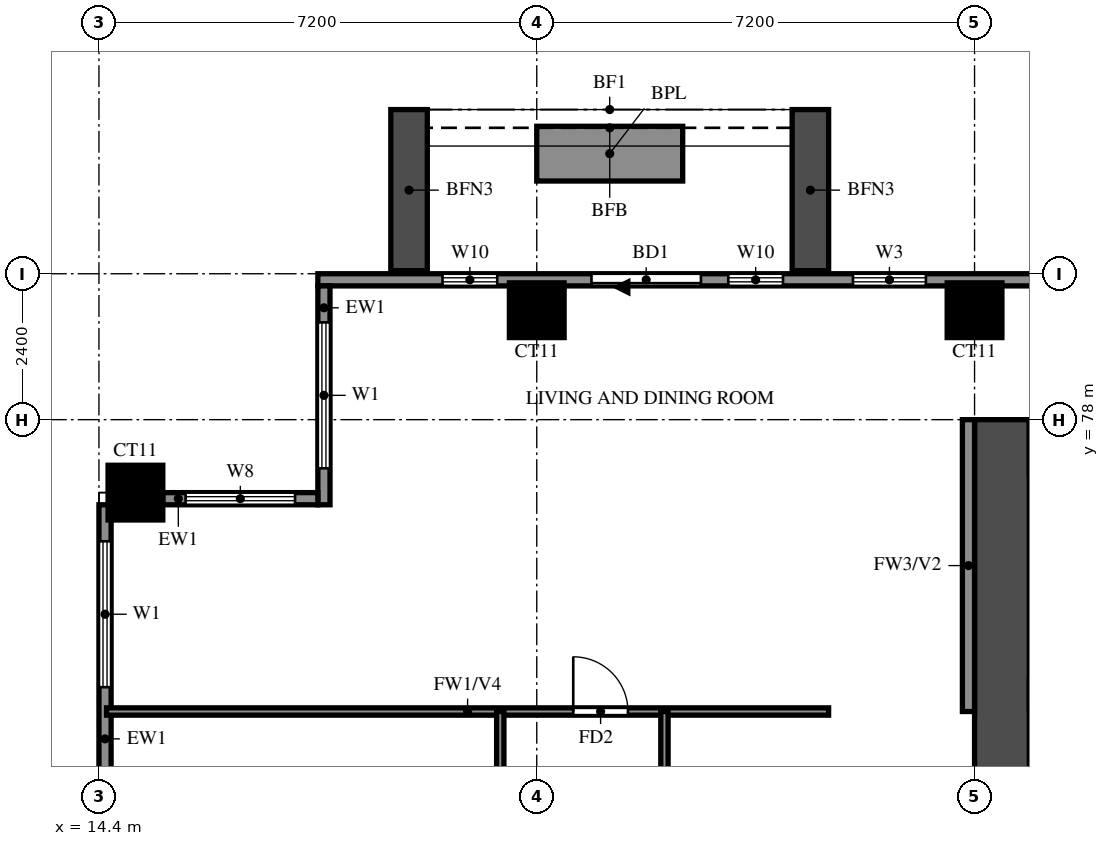
"""IFC4 building model, lengths in metres.
Left out: names, types, materials, properties, quantities, classifications, styles, units other than length and angle.
Written with IfcOpenShell. Run it as: python <this file> out.ifc"""

import sys

from ifc_helpers import new_model, si_unit, direction, frame, frame_2d, origin, origin_2d, place, context, subcontext, project, spatial, rectangle, extrude, source, transform, mapped, element, fill, save


model = new_model("IFC4")
c1 = context("Model", 3, precision=1e-05, world=origin(), true_north=direction((0.0, 1.0)))
c2 = subcontext(c1, "Body", "Model", "MODEL_VIEW")
j1 = project(units=[si_unit("LENGTHUNIT", "METRE"), si_unit("PLANEANGLEUNIT", "RADIAN")], contexts=[c1])
p1 = place(None, origin())
s1 = spatial("IfcSite", under=j1, at=p1, CompositionType="ELEMENT")
p2 = place(p1, origin())
s2 = spatial("IfcBuilding", under=s1, at=p2, CompositionType="ELEMENT")
p3 = place(p2, frame((0.0, 0.0, 100.5)))
s3 = spatial("IfcBuildingStorey", under=s2, at=p3, CompositionType="ELEMENT", Elevation=100.5)
m1 = source(origin(), c2, "Body", "SweptSolid", [
    extrude(rectangle(XDim=0.9, YDim=0.9, at=origin_2d()), origin(), (0.0, 0.0, 1.0), 3.18),
])
for number, where, z_axis, x_axis in (
    (1, (15.0, 76.8, 0.0), (0.0, 0.0, 1.0), (1.0, 0.0, 0.0)),
    (2, (21.6, 79.8, 0.0), (0.0, 0.0, 1.0), (1.0, 0.0, 0.0)),
    (3, (28.8, 79.8, 0.0), (0.0, 0.0, 1.0), (1.0, 0.0, 0.0)),
):
    element("IfcColumn", number, at=place(p3, frame(where, z_axis=z_axis, x_axis=x_axis)), inside=s3, PredefinedType="COLUMN", context=c2, shape_type="MappedRepresentation", body=[
        mapped(m1, transform((0.0, 0.0, 0.0))),
    ])
p4 = place(p3, frame((29.25, 66.0, 0.0), z_axis=(0.0, 0.0, 1.0), x_axis=(0.0, 1.0, 0.0)))
e4 = element("IfcWall", 4, at=p4, inside=s3, PredefinedType="SHEAR", context=c2, shape_type="SweptSolid", body=[
    extrude(rectangle(XDim=12.0, YDim=0.9, at=frame_2d((6.0, 0.0))), origin(), (0.0, 0.0, 1.0), 3.18),
])
p5 = place(p3, frame((29.7, 73.475, 0.0), z_axis=(0.0, 0.0, 1.0), x_axis=(1.0, 0.0, 0.0)))
e5 = element("IfcWall", 5, at=p5, inside=s3, PredefinedType="SHEAR", context=c2, shape_type="SweptSolid", body=[
    extrude(rectangle(XDim=3.175, YDim=0.45, at=frame_2d((1.587, 0.0))), origin(), (0.0, 0.0, 1.0), 3.18),
])
p6 = place(p3, frame((82.6, 80.3, 0.0), z_axis=(0.0, 0.0, 1.0), x_axis=(-1.0, 0.0, 0.0)))
e6 = element("IfcWall", 6, at=p6, inside=s3, PredefinedType="SOLIDWALL", context=c2, shape_type="SweptSolid", body=[
    extrude(rectangle(XDim=64.6, YDim=0.2, at=frame_2d((32.3, 0.0))), origin(), (0.0, 0.0, 1.0), 3.18),
])
p7 = place(p6, frame((58.3, 0.0, 0.0)))
e7 = element("IfcOpeningElement", 7, at=p7, cuts=e6, PredefinedType="OPENING", context=c2, shape_type="SweptSolid", body=[
    extrude(rectangle(XDim=1.8, YDim=2.4, at=frame_2d((0.9, 1.2))), frame((0.0, 0.11, 0.0), z_axis=(0.0, -1.0, 0.0), x_axis=(1.0, 0.0, 0.0)), (0.0, 0.0, 1.0), 0.22),
])
p8 = place(p6, frame((54.6, 0.0, 0.6)))
e8 = element("IfcOpeningElement", 8, at=p8, cuts=e6, PredefinedType="OPENING", context=c2, shape_type="SweptSolid", body=[
    extrude(rectangle(XDim=1.2, YDim=2.4, at=frame_2d((0.6, 1.2))), frame((0.0, 0.11, 0.0), z_axis=(0.0, -1.0, 0.0), x_axis=(1.0, 0.0, 0.0)), (0.0, 0.0, 1.0), 0.22),
])
p9 = place(p6, frame((56.95, 0.0, 0.6)))
e9 = element("IfcOpeningElement", 9, at=p9, cuts=e6, PredefinedType="OPENING", context=c2, shape_type="SweptSolid", body=[
    extrude(rectangle(XDim=0.9, YDim=2.4, at=frame_2d((0.45, 1.2))), frame((0.0, 0.11, 0.0), z_axis=(0.0, -1.0, 0.0), x_axis=(1.0, 0.0, 0.0)), (0.0, 0.0, 1.0), 0.22),
])
p10 = place(p6, frame((61.65, 0.0, 0.6)))
e10 = element("IfcOpeningElement", 10, at=p10, cuts=e6, PredefinedType="OPENING", context=c2, shape_type="SweptSolid", body=[
    extrude(rectangle(XDim=0.9, YDim=2.4, at=frame_2d((0.45, 1.2))), frame((0.0, 0.11, 0.0), z_axis=(0.0, -1.0, 0.0), x_axis=(1.0, 0.0, 0.0)), (0.0, 0.0, 1.0), 0.22),
])
p11 = place(p6, frame((0.7, 0.0, 0.6)))
e11 = element("IfcOpeningElement", 11, at=p11, cuts=e6, PredefinedType="OPENING", context=c2, shape_type="SweptSolid", body=[
    extrude(rectangle(XDim=1.8, YDim=2.4, at=frame_2d((0.9, 1.2))), frame((0.0, 0.11, 0.0), z_axis=(0.0, -1.0, 0.0), x_axis=(1.0, 0.0, 0.0)), (0.0, 0.0, 1.0), 0.22),
])
p12 = place(p6, frame((4.367, 0.0, 0.6)))
e12 = element("IfcOpeningElement", 12, at=p12, cuts=e6, PredefinedType="OPENING", context=c2, shape_type="SweptSolid", body=[
    extrude(rectangle(XDim=2.4, YDim=2.4, at=frame_2d((1.2, 1.2))), frame((0.0, 0.11, 0.0), z_axis=(0.0, -1.0, 0.0), x_axis=(1.0, 0.0, 0.0)), (0.0, 0.0, 1.0), 0.22),
])
p13 = place(p6, frame((7.233, 0.0, 0.6)))
e13 = element("IfcOpeningElement", 13, at=p13, cuts=e6, PredefinedType="OPENING", context=c2, shape_type="SweptSolid", body=[
    extrude(rectangle(XDim=2.4, YDim=2.4, at=frame_2d((1.2, 1.2))), frame((0.0, 0.11, 0.0), z_axis=(0.0, -1.0, 0.0), x_axis=(1.0, 0.0, 0.0)), (0.0, 0.0, 1.0), 0.22),
])
p14 = place(p3, frame((18.1, 80.2, 0.0), z_axis=(0.0, 0.0, 1.0), x_axis=(0.0, -1.0, 0.0)))
e14 = element("IfcWall", 14, at=p14, inside=s3, PredefinedType="SOLIDWALL", context=c2, shape_type="SweptSolid", body=[
    extrude(rectangle(XDim=3.6, YDim=0.2, at=frame_2d((1.8, 0.0))), origin(), (0.0, 0.0, 1.0), 3.18),
])
p15 = place(p14, frame((0.6, 0.0, 0.6)))
e15 = element("IfcOpeningElement", 15, at=p15, cuts=e14, PredefinedType="OPENING", context=c2, shape_type="SweptSolid", body=[
    extrude(rectangle(XDim=2.4, YDim=2.4, at=frame_2d((1.2, 1.2))), frame((0.0, 0.11, 0.0), z_axis=(0.0, -1.0, 0.0), x_axis=(1.0, 0.0, 0.0)), (0.0, 0.0, 1.0), 0.22),
])
p16 = place(p3, frame((18.0, 76.7, 0.0), z_axis=(0.0, 0.0, 1.0), x_axis=(-1.0, 0.0, 0.0)))
e16 = element("IfcWall", 16, at=p16, inside=s3, PredefinedType="SOLIDWALL", context=c2, shape_type="SweptSolid", body=[
    extrude(rectangle(XDim=2.55, YDim=0.2, at=frame_2d((1.275, 0.0))), origin(), (0.0, 0.0, 1.0), 3.18),
])
p17 = place(p16, frame((0.375, 0.0, 0.6)))
e17 = element("IfcOpeningElement", 17, at=p17, cuts=e16, PredefinedType="OPENING", context=c2, shape_type="SweptSolid", body=[
    extrude(rectangle(XDim=1.8, YDim=2.4, at=frame_2d((0.9, 1.2))), frame((0.0, 0.11, 0.0), z_axis=(0.0, -1.0, 0.0), x_axis=(1.0, 0.0, 0.0)), (0.0, 0.0, 1.0), 0.22),
])
p18 = place(p3, frame((14.5, 76.6, 0.0), z_axis=(0.0, 0.0, 1.0), x_axis=(0.0, -1.0, 0.0)))
e18 = element("IfcWall", 18, at=p18, inside=s3, PredefinedType="SOLIDWALL", context=c2, shape_type="SweptSolid", body=[
    extrude(rectangle(XDim=7.0, YDim=0.2, at=frame_2d((3.5, 0.0))), origin(), (0.0, 0.0, 1.0), 3.18),
])
p19 = place(p18, frame((4.55, 0.0, 1.5)))
e19 = element("IfcOpeningElement", 19, at=p19, cuts=e18, PredefinedType="OPENING", context=c2, shape_type="SweptSolid", body=[
    extrude(rectangle(XDim=0.9, YDim=0.9, at=frame_2d((0.45, 0.45))), frame((0.0, 0.11, 0.0), z_axis=(0.0, -1.0, 0.0), x_axis=(1.0, 0.0, 0.0)), (0.0, 0.0, 1.0), 0.22),
])
p20 = place(p18, frame((0.6, 0.0, 0.6)))
e20 = element("IfcOpeningElement", 20, at=p20, cuts=e18, PredefinedType="OPENING", context=c2, shape_type="SweptSolid", body=[
    extrude(rectangle(XDim=2.4, YDim=2.4, at=frame_2d((1.2, 1.2))), frame((0.0, 0.11, 0.0), z_axis=(0.0, -1.0, 0.0), x_axis=(1.0, 0.0, 0.0)), (0.0, 0.0, 1.0), 0.22),
])
for number, where, z_axis, x_axis in (
    (21, (26.1, 80.45, 0.0), (0.0, 0.0, 1.0), (0.0, 1.0, 0.0)),
    (22, (19.5, 80.45, 0.0), (0.0, 0.0, 1.0), (0.0, 1.0, 0.0)),
):
    element("IfcWall", number, at=place(p3, frame(where, z_axis=z_axis, x_axis=x_axis)), inside=s3, PredefinedType="SOLIDWALL", context=c2, shape_type="SweptSolid", body=[
        extrude(rectangle(XDim=2.65, YDim=0.6, at=frame_2d((1.325, 0.0))), origin(), (0.0, 0.0, 1.0), 2.85),
    ])
p21 = place(p3, frame((24.0, 82.375, 0.0), z_axis=(0.0, 0.0, 1.0), x_axis=(-1.0, 0.0, 0.0)))
e23 = element("IfcWall", 23, at=p21, inside=s3, PredefinedType="SOLIDWALL", context=c2, shape_type="SweptSolid", body=[
    extrude(rectangle(XDim=2.4, YDim=0.9, at=frame_2d((1.2, 0.0))), origin(), (0.0, 0.0, 1.0), 0.9),
])
p22 = place(p3, frame((28.7, 73.2, 0.0), z_axis=(0.0, 0.0, 1.0), x_axis=(0.0, 1.0, 0.0)))
e24 = element("IfcWall", 24, at=p22, inside=s3, PredefinedType="SOLIDWALL", context=c2, shape_type="SweptSolid", body=[
    extrude(rectangle(XDim=4.8, YDim=0.2, at=frame_2d((2.4, 0.0))), origin(), (0.0, 0.0, 1.0), 3.18),
])
p23 = place(p3, frame((14.525, 73.2, 0.0), z_axis=(0.0, 0.0, 1.0), x_axis=(1.0, 0.0, 0.0)))
e25 = element("IfcWall", 25, at=p23, inside=s3, PredefinedType="PARTITIONING", context=c2, shape_type="SweptSolid", body=[
    extrude(rectangle(XDim=11.875, YDim=0.12, at=frame_2d((5.938, 0.0))), origin(), (0.0, 0.0, 1.0), 2.28),
])
p24 = place(p23, frame((7.675, 0.0, 0.0)))
e26 = element("IfcOpeningElement", 26, at=p24, cuts=e25, PredefinedType="OPENING", context=c2, shape_type="SweptSolid", body=[
    extrude(rectangle(XDim=0.9, YDim=2.1, at=frame_2d((0.45, 1.05))), frame((0.0, 0.07, 0.0), z_axis=(0.0, -1.0, 0.0), x_axis=(1.0, 0.0, 0.0)), (0.0, 0.0, 1.0), 0.14),
])
p25 = place(p3, frame((21.0, 69.6, 0.0), z_axis=(0.0, 0.0, 1.0), x_axis=(0.0, 1.0, 0.0)))
e27 = element("IfcWall", 27, at=p25, inside=s3, PredefinedType="PARTITIONING", context=c2, shape_type="SweptSolid", body=[
    extrude(rectangle(XDim=3.6, YDim=0.12, at=frame_2d((1.8, 0.0))), origin(), (0.0, 0.0, 1.0), 3.18),
])
p26 = place(p3, frame((23.7, 64.8, 0.0), z_axis=(0.0, 0.0, 1.0), x_axis=(0.0, 1.0, 0.0)))
e28 = element("IfcWall", 28, at=p26, inside=s3, PredefinedType="PARTITIONING", context=c2, shape_type="SweptSolid", body=[
    extrude(rectangle(XDim=8.4, YDim=0.12, at=frame_2d((4.2, 0.0))), origin(), (0.0, 0.0, 1.0), 3.18),
])
p27 = place(p26, frame((1.475, 0.0, 0.0)))
e29 = element("IfcOpeningElement", 29, at=p27, cuts=e28, PredefinedType="OPENING", context=c2, shape_type="SweptSolid", body=[
    extrude(rectangle(XDim=0.9, YDim=2.1, at=frame_2d((0.45, 1.05))), frame((0.0, 0.07, 0.0), z_axis=(0.0, -1.0, 0.0), x_axis=(1.0, 0.0, 0.0)), (0.0, 0.0, 1.0), 0.14),
])
p28 = place(p26, frame((5.675, 0.0, 0.0)))
e30 = element("IfcOpeningElement", 30, at=p28, cuts=e28, PredefinedType="OPENING", context=c2, shape_type="SweptSolid", body=[
    extrude(rectangle(XDim=0.9, YDim=2.1, at=frame_2d((0.45, 1.05))), frame((0.0, 0.07, 0.0), z_axis=(0.0, -1.0, 0.0), x_axis=(1.0, 0.0, 0.0)), (0.0, 0.0, 1.0), 0.14),
])
p29 = place(p7, origin())
e31 = element("IfcDoor", 31, at=p29, inside=s3, OperationType="DOUBLE_DOOR_SLIDING", PredefinedType="DOOR", context=c2, shape_type="SweptSolid", body=[
    extrude(rectangle(XDim=1.8, YDim=2.4, at=frame_2d((0.9, 1.2))), frame((0.0, 0.025, 0.0), z_axis=(0.0, -1.0, 0.0), x_axis=(1.0, 0.0, 0.0)), (0.0, 0.0, 1.0), 0.05),
])
fill(e7, e31)
p30 = place(p8, origin())
e32 = element("IfcWindow", 32, at=p30, inside=s3, PartitioningType="SINGLE_PANEL", PredefinedType="WINDOW", context=c2, shape_type="SweptSolid", body=[
    extrude(rectangle(XDim=1.2, YDim=2.4, at=frame_2d((0.6, 1.2))), frame((0.0, 0.03, 0.0), z_axis=(0.0, -1.0, 0.0), x_axis=(1.0, 0.0, 0.0)), (0.0, 0.0, 1.0), 0.06),
])
fill(e8, e32)
p31 = place(p9, origin())
e33 = element("IfcWindow", 33, at=p31, inside=s3, PartitioningType="SINGLE_PANEL", PredefinedType="WINDOW", context=c2, shape_type="SweptSolid", body=[
    extrude(rectangle(XDim=0.9, YDim=2.4, at=frame_2d((0.45, 1.2))), frame((0.0, 0.03, 0.0), z_axis=(0.0, -1.0, 0.0), x_axis=(1.0, 0.0, 0.0)), (0.0, 0.0, 1.0), 0.06),
])
fill(e9, e33)
p32 = place(p10, origin())
e34 = element("IfcWindow", 34, at=p32, inside=s3, PartitioningType="SINGLE_PANEL", PredefinedType="WINDOW", context=c2, shape_type="SweptSolid", body=[
    extrude(rectangle(XDim=0.9, YDim=2.4, at=frame_2d((0.45, 1.2))), frame((0.0, 0.03, 0.0), z_axis=(0.0, -1.0, 0.0), x_axis=(1.0, 0.0, 0.0)), (0.0, 0.0, 1.0), 0.06),
])
fill(e10, e34)
p33 = place(p15, origin())
e35 = element("IfcWindow", 35, at=p33, inside=s3, PartitioningType="DOUBLE_PANEL_VERTICAL", PredefinedType="WINDOW", context=c2, shape_type="SweptSolid", body=[
    extrude(rectangle(XDim=2.4, YDim=2.4, at=frame_2d((1.2, 1.2))), frame((0.0, 0.03, 0.0), z_axis=(0.0, -1.0, 0.0), x_axis=(1.0, 0.0, 0.0)), (0.0, 0.0, 1.0), 0.06),
])
fill(e15, e35)
p34 = place(p17, origin())
e36 = element("IfcWindow", 36, at=p34, inside=s3, PartitioningType="DOUBLE_PANEL_VERTICAL", PredefinedType="WINDOW", context=c2, shape_type="SweptSolid", body=[
    extrude(rectangle(XDim=1.8, YDim=2.4, at=frame_2d((0.9, 1.2))), frame((0.0, 0.03, 0.0), z_axis=(0.0, -1.0, 0.0), x_axis=(1.0, 0.0, 0.0)), (0.0, 0.0, 1.0), 0.06),
])
fill(e17, e36)
p35 = place(p20, origin())
e37 = element("IfcWindow", 37, at=p35, inside=s3, PartitioningType="DOUBLE_PANEL_VERTICAL", PredefinedType="WINDOW", context=c2, shape_type="SweptSolid", body=[
    extrude(rectangle(XDim=2.4, YDim=2.4, at=frame_2d((1.2, 1.2))), frame((0.0, 0.03, 0.0), z_axis=(0.0, -1.0, 0.0), x_axis=(1.0, 0.0, 0.0)), (0.0, 0.0, 1.0), 0.06),
])
fill(e20, e37)
p36 = place(p24, origin())
e38 = element("IfcDoor", 38, at=p36, inside=s3, OperationType="SINGLE_SWING_RIGHT", PredefinedType="DOOR", context=c2, shape_type="SweptSolid", body=[
    extrude(rectangle(XDim=0.9, YDim=2.1, at=frame_2d((0.45, 1.05))), frame((0.0, 0.025, 0.0), z_axis=(0.0, -1.0, 0.0), x_axis=(1.0, 0.0, 0.0)), (0.0, 0.0, 1.0), 0.05),
])
fill(e26, e38)
save(model, sys.argv[1])
